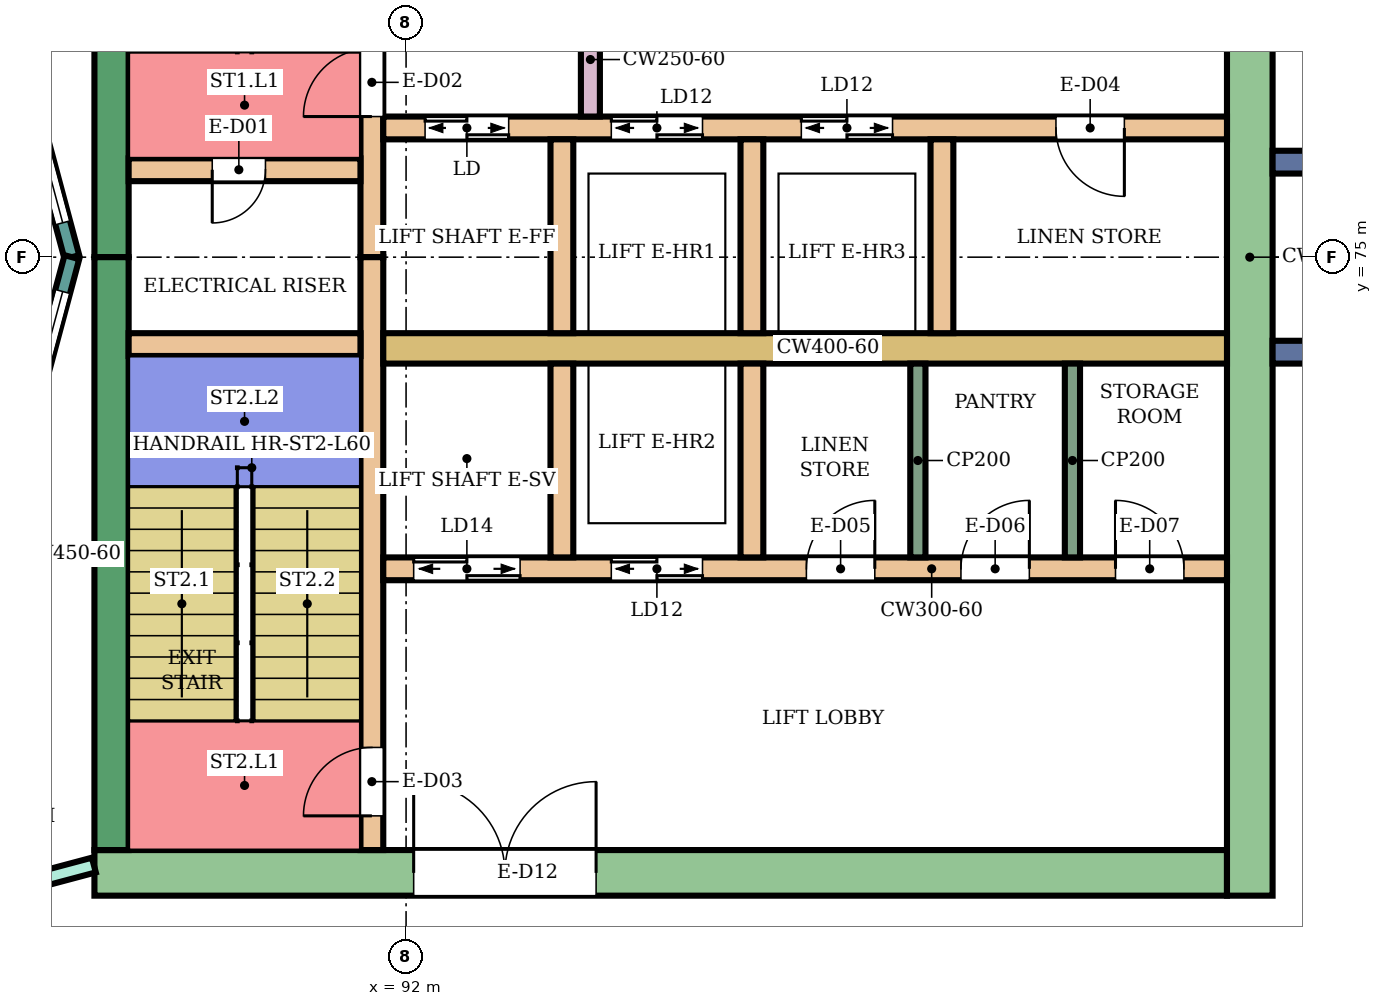
"""IFC4 building model, lengths in metres.
Left out: names, types, materials, properties, quantities, classifications, styles, units other than length and angle.
Written with IfcOpenShell. Run it as: python <this file> out.ifc"""

import sys

from ifc_helpers import new_model, si_unit, direction, frame, frame_2d, origin, place, context, subcontext, project, spatial, rectangle, extrude, element, fill, save


model = new_model("IFC4")
c1 = context("Model", 3, precision=1e-05, world=origin(), true_north=direction((0.0, 1.0)))
c2 = subcontext(c1, "Body", "Model", "MODEL_VIEW")
j1 = project(units=[si_unit("LENGTHUNIT", "METRE"), si_unit("PLANEANGLEUNIT", "RADIAN")], contexts=[c1])
p1 = place(None, origin())
s1 = spatial("IfcSite", under=j1, at=p1, CompositionType="ELEMENT")
p2 = place(p1, origin())
s2 = spatial("IfcBuilding", under=s1, at=p2, CompositionType="ELEMENT")
p3 = place(p2, frame((0.0, 0.0, 262.5)))
s3 = spatial("IfcBuildingStorey", under=s2, at=p3, CompositionType="ELEMENT", Elevation=262.5)
p4 = place(p3, frame((87.9, 66.9, 0.0), z_axis=(0.0, 0.0, 1.0), x_axis=(1.0, 0.0, 0.0)))
e1 = element("IfcWall", 1, at=p4, inside=s3, PredefinedType="SHEAR", context=c2, shape_type="SweptSolid", body=[
    extrude(rectangle(XDim=14.9, YDim=0.6, at=frame_2d((7.45, 0.0))), origin(), (0.0, 0.0, 1.0), 3.88),
])
p5 = place(p4, frame((4.2, 0.0, 0.0)))
e2 = element("IfcOpeningElement", 2, at=p5, cuts=e1, PredefinedType="OPENING", context=c2, shape_type="SweptSolid", body=[
    extrude(rectangle(XDim=2.4, YDim=2.4, at=frame_2d((1.2, 1.2))), frame((0.0, 0.31, 0.0), z_axis=(0.0, -1.0, 0.0), x_axis=(1.0, 0.0, 0.0)), (0.0, 0.0, 1.0), 0.62),
])
for number, where, z_axis, x_axis in (
    (3, (88.125, 75.0, 0.0), (0.0, 0.0, 1.0), (0.0, 1.0, 0.0)),
    (4, (88.125, 67.2, 0.0), (0.0, 0.0, 1.0), (0.0, 1.0, 0.0)),
):
    element("IfcWall", number, at=place(p3, frame(where, z_axis=z_axis, x_axis=x_axis)), inside=s3, PredefinedType="SHEAR", context=c2, shape_type="SweptSolid", body=[
        extrude(rectangle(XDim=7.8, YDim=0.45, at=frame_2d((3.9, 0.0))), origin(), (0.0, 0.0, 1.0), 3.88),
    ])
p6 = place(p3, frame((103.1, 66.6, 0.0), z_axis=(0.0, 0.0, 1.0), x_axis=(0.0, 1.0, 0.0)))
e5 = element("IfcWall", 5, at=p6, inside=s3, PredefinedType="SHEAR", context=c2, shape_type="SweptSolid", body=[
    extrude(rectangle(XDim=16.8, YDim=0.6, at=frame_2d((8.4, 0.0))), origin(), (0.0, 0.0, 1.0), 3.88),
])
p7 = place(p3, frame((91.55, 75.0, 0.0), z_axis=(0.0, 0.0, 1.0), x_axis=(0.0, 1.0, 0.0)))
e6 = element("IfcWall", 6, at=p7, inside=s3, PredefinedType="SHEAR", context=c2, shape_type="SweptSolid", body=[
    extrude(rectangle(XDim=7.8, YDim=0.3, at=frame_2d((3.9, 0.0))), origin(), (0.0, 0.0, 1.0), 3.88),
])
p8 = place(p7, frame((1.85, 0.0, 0.0)))
e7 = element("IfcOpeningElement", 7, at=p8, cuts=e6, PredefinedType="OPENING", context=c2, shape_type="SweptSolid", body=[
    extrude(rectangle(XDim=0.9, YDim=2.1, at=frame_2d((0.45, 1.05))), frame((0.0, 0.16, 0.0), z_axis=(0.0, -1.0, 0.0), x_axis=(1.0, 0.0, 0.0)), (0.0, 0.0, 1.0), 0.32),
])
p9 = place(p3, frame((91.55, 67.2, 0.0), z_axis=(0.0, 0.0, 1.0), x_axis=(0.0, 1.0, 0.0)))
e8 = element("IfcWall", 8, at=p9, inside=s3, PredefinedType="SHEAR", context=c2, shape_type="SweptSolid", body=[
    extrude(rectangle(XDim=7.8, YDim=0.3, at=frame_2d((3.9, 0.0))), origin(), (0.0, 0.0, 1.0), 3.88),
])
p10 = place(p9, frame((0.45, 0.0, 0.0)))
e9 = element("IfcOpeningElement", 9, at=p10, cuts=e8, PredefinedType="OPENING", context=c2, shape_type="SweptSolid", body=[
    extrude(rectangle(XDim=0.9, YDim=2.1, at=frame_2d((0.45, 1.05))), frame((0.0, 0.16, 0.0), z_axis=(0.0, -1.0, 0.0), x_axis=(1.0, 0.0, 0.0)), (0.0, 0.0, 1.0), 0.32),
])
p11 = place(p3, frame((88.35, 76.15, 0.0), z_axis=(0.0, 0.0, 1.0), x_axis=(1.0, 0.0, 0.0)))
e10 = element("IfcWall", 10, at=p11, inside=s3, PredefinedType="SHEAR", context=c2, shape_type="SweptSolid", body=[
    extrude(rectangle(XDim=3.05, YDim=0.3, at=frame_2d((1.525, 0.0))), origin(), (0.0, 0.0, 1.0), 3.88),
])
p12 = place(p11, frame((1.1, 0.0, 0.0)))
e11 = element("IfcOpeningElement", 11, at=p12, cuts=e10, PredefinedType="OPENING", context=c2, shape_type="SweptSolid", body=[
    extrude(rectangle(XDim=0.7, YDim=2.0, at=frame_2d((0.35, 1.0))), frame((0.0, 0.16, 0.0), z_axis=(0.0, -1.0, 0.0), x_axis=(1.0, 0.0, 0.0)), (0.0, 0.0, 1.0), 0.32),
])
p13 = place(p3, frame((88.35, 73.85, 0.0), z_axis=(0.0, 0.0, 1.0), x_axis=(1.0, 0.0, 0.0)))
e12 = element("IfcWall", 12, at=p13, inside=s3, PredefinedType="SHEAR", context=c2, shape_type="SweptSolid", body=[
    extrude(rectangle(XDim=3.05, YDim=0.3, at=frame_2d((1.525, 0.0))), origin(), (0.0, 0.0, 1.0), 3.88),
])
p14 = place(p3, frame((91.7, 76.7, 0.0), z_axis=(0.0, 0.0, 1.0), x_axis=(1.0, 0.0, 0.0)))
e13 = element("IfcWall", 13, at=p14, inside=s3, PredefinedType="SHEAR", context=c2, shape_type="SweptSolid", body=[
    extrude(rectangle(XDim=11.1, YDim=0.3, at=frame_2d((5.55, 0.0))), origin(), (0.0, 0.0, 1.0), 3.88),
])
p15 = place(p14, frame((0.55, 0.0, 0.0)))
e14 = element("IfcOpeningElement", 14, at=p15, cuts=e13, PredefinedType="OPENING", context=c2, shape_type="SweptSolid", body=[
    extrude(rectangle(XDim=1.1, YDim=2.1, at=frame_2d((0.55, 1.05))), frame((0.0, 0.16, 0.0), z_axis=(0.0, -1.0, 0.0), x_axis=(1.0, 0.0, 0.0)), (0.0, 0.0, 1.0), 0.32),
])
p16 = place(p14, frame((3.0, 0.0, 0.0)))
e15 = element("IfcOpeningElement", 15, at=p16, cuts=e13, PredefinedType="OPENING", context=c2, shape_type="SweptSolid", body=[
    extrude(rectangle(XDim=1.2, YDim=2.1, at=frame_2d((0.6, 1.05))), frame((0.0, 0.16, 0.0), z_axis=(0.0, -1.0, 0.0), x_axis=(1.0, 0.0, 0.0)), (0.0, 0.0, 1.0), 0.32),
])
p17 = place(p14, frame((5.5, 0.0, 0.0)))
e16 = element("IfcOpeningElement", 16, at=p17, cuts=e13, PredefinedType="OPENING", context=c2, shape_type="SweptSolid", body=[
    extrude(rectangle(XDim=1.2, YDim=2.1, at=frame_2d((0.6, 1.05))), frame((0.0, 0.16, 0.0), z_axis=(0.0, -1.0, 0.0), x_axis=(1.0, 0.0, 0.0)), (0.0, 0.0, 1.0), 0.32),
])
p18 = place(p14, frame((8.85, 0.0, 0.0)))
e17 = element("IfcOpeningElement", 17, at=p18, cuts=e13, PredefinedType="OPENING", context=c2, shape_type="SweptSolid", body=[
    extrude(rectangle(XDim=0.9, YDim=2.1, at=frame_2d((0.45, 1.05))), frame((0.0, 0.16, 0.0), z_axis=(0.0, -1.0, 0.0), x_axis=(1.0, 0.0, 0.0)), (0.0, 0.0, 1.0), 0.32),
])
p19 = place(p3, frame((91.7, 73.8, 0.0), z_axis=(0.0, 0.0, 1.0), x_axis=(1.0, 0.0, 0.0)))
e18 = element("IfcWall", 18, at=p19, inside=s3, PredefinedType="SHEAR", context=c2, shape_type="SweptSolid", body=[
    extrude(rectangle(XDim=11.1, YDim=0.4, at=frame_2d((5.55, 0.0))), origin(), (0.0, 0.0, 1.0), 3.88),
])
p20 = place(p3, frame((91.7, 70.9, 0.0), z_axis=(0.0, 0.0, 1.0), x_axis=(1.0, 0.0, 0.0)))
e19 = element("IfcWall", 19, at=p20, inside=s3, PredefinedType="SHEAR", context=c2, shape_type="SweptSolid", body=[
    extrude(rectangle(XDim=11.1, YDim=0.3, at=frame_2d((5.55, 0.0))), origin(), (0.0, 0.0, 1.0), 3.88),
])
p21 = place(p20, frame((0.4, 0.0, 0.0)))
e20 = element("IfcOpeningElement", 20, at=p21, cuts=e19, PredefinedType="OPENING", context=c2, shape_type="SweptSolid", body=[
    extrude(rectangle(XDim=1.4, YDim=2.1, at=frame_2d((0.7, 1.05))), frame((0.0, 0.16, 0.0), z_axis=(0.0, -1.0, 0.0), x_axis=(1.0, 0.0, 0.0)), (0.0, 0.0, 1.0), 0.32),
])
p22 = place(p20, frame((3.0, 0.0, 0.0)))
e21 = element("IfcOpeningElement", 21, at=p22, cuts=e19, PredefinedType="OPENING", context=c2, shape_type="SweptSolid", body=[
    extrude(rectangle(XDim=1.2, YDim=2.1, at=frame_2d((0.6, 1.05))), frame((0.0, 0.16, 0.0), z_axis=(0.0, -1.0, 0.0), x_axis=(1.0, 0.0, 0.0)), (0.0, 0.0, 1.0), 0.32),
])
p23 = place(p20, frame((5.567, 0.0, 0.0)))
e22 = element("IfcOpeningElement", 22, at=p23, cuts=e19, PredefinedType="OPENING", context=c2, shape_type="SweptSolid", body=[
    extrude(rectangle(XDim=0.9, YDim=2.1, at=frame_2d((0.45, 1.05))), frame((0.0, 0.16, 0.0), z_axis=(0.0, -1.0, 0.0), x_axis=(1.0, 0.0, 0.0)), (0.0, 0.0, 1.0), 0.32),
])
p24 = place(p20, frame((7.6, 0.0, 0.0)))
e23 = element("IfcOpeningElement", 23, at=p24, cuts=e19, PredefinedType="OPENING", context=c2, shape_type="SweptSolid", body=[
    extrude(rectangle(XDim=0.9, YDim=2.1, at=frame_2d((0.45, 1.05))), frame((0.0, 0.16, 0.0), z_axis=(0.0, -1.0, 0.0), x_axis=(1.0, 0.0, 0.0)), (0.0, 0.0, 1.0), 0.32),
])
p25 = place(p20, frame((9.633, 0.0, 0.0)))
e24 = element("IfcOpeningElement", 24, at=p25, cuts=e19, PredefinedType="OPENING", context=c2, shape_type="SweptSolid", body=[
    extrude(rectangle(XDim=0.9, YDim=2.1, at=frame_2d((0.45, 1.05))), frame((0.0, 0.16, 0.0), z_axis=(0.0, -1.0, 0.0), x_axis=(1.0, 0.0, 0.0)), (0.0, 0.0, 1.0), 0.32),
])
for number, where, z_axis, x_axis in (
    (25, (94.05, 74.0, 0.0), (0.0, 0.0, 1.0), (0.0, 1.0, 0.0)),
    (26, (96.55, 74.0, 0.0), (0.0, 0.0, 1.0), (0.0, 1.0, 0.0)),
    (27, (99.05, 74.0, 0.0), (0.0, 0.0, 1.0), (0.0, 1.0, 0.0)),
    (28, (94.05, 71.05, 0.0), (0.0, 0.0, 1.0), (0.0, 1.0, 0.0)),
    (29, (96.55, 71.05, 0.0), (0.0, 0.0, 1.0), (0.0, 1.0, 0.0)),
):
    element("IfcWall", number, at=place(p3, frame(where, z_axis=z_axis, x_axis=x_axis)), inside=s3, PredefinedType="SHEAR", context=c2, shape_type="SweptSolid", body=[
        extrude(rectangle(XDim=2.55, YDim=0.3, at=frame_2d((1.275, 0.0))), origin(), (0.0, 0.0, 1.0), 3.88),
    ])
p26 = place(p3, frame((94.425, 76.85, 0.0), z_axis=(0.0, 0.0, 1.0), x_axis=(0.0, 1.0, 0.0)))
e30 = element("IfcWall", 30, at=p26, inside=s3, PredefinedType="SHEAR", context=c2, shape_type="SweptSolid", body=[
    extrude(rectangle(XDim=1.5, YDim=0.25, at=frame_2d((0.75, 0.0))), origin(), (0.0, 0.0, 1.0), 3.88),
])
for number, where, z_axis, x_axis in (
    (31, (103.4, 73.75, 0.0), (0.0, 0.0, 1.0), (1.0, 0.0, 0.0)),
    (32, (103.4, 76.25, 0.0), (0.0, 0.0, 1.0), (1.0, 0.0, 0.0)),
):
    element("IfcWall", number, at=place(p3, frame(where, z_axis=z_axis, x_axis=x_axis)), inside=s3, PredefinedType="NOTDEFINED", context=c2, shape_type="SweptSolid", body=[
        extrude(rectangle(XDim=2.416, YDim=0.3, at=frame_2d((1.208, 0.0))), origin(), (0.0, 0.0, 1.0), 4.2),
    ])
p27 = place(p3, frame((87.604, 75.0, 0.0), z_axis=(0.0, 0.0, 1.0), x_axis=(-0.258789828301, 0.965933654434, 0.0)))
e33 = element("IfcWall", 33, at=p27, inside=s3, PredefinedType="NOTDEFINED", context=c2, shape_type="SweptSolid", body=[
    extrude(rectangle(XDim=3.936, YDim=0.2, at=frame_2d((1.968, 0.0))), origin(), (0.0, 0.0, 1.0), 4.2),
])
p28 = place(p27, frame((0.468, 0.0, 0.9)))
e34 = element("IfcOpeningElement", 34, at=p28, cuts=e33, PredefinedType="OPENING", context=c2, shape_type="SweptSolid", body=[
    extrude(rectangle(XDim=3.0, YDim=2.3, at=frame_2d((1.5, 1.15))), frame((0.0, 0.11, 0.0), z_axis=(0.0, -1.0, 0.0), x_axis=(1.0, 0.0, 0.0)), (0.0, 0.0, 1.0), 0.22),
])
p29 = place(p3, frame((86.585, 71.198, 0.0), z_axis=(0.0, 0.0, 1.0), x_axis=(0.258789828301, 0.965933654434, 0.0)))
e35 = element("IfcWall", 35, at=p29, inside=s3, PredefinedType="NOTDEFINED", context=c2, shape_type="SweptSolid", body=[
    extrude(rectangle(XDim=3.936, YDim=0.2, at=frame_2d((1.968, 0.0))), origin(), (0.0, 0.0, 1.0), 4.2),
])
p30 = place(p29, frame((0.468, 0.0, 0.9)))
e36 = element("IfcOpeningElement", 36, at=p30, cuts=e35, PredefinedType="OPENING", context=c2, shape_type="SweptSolid", body=[
    extrude(rectangle(XDim=3.0, YDim=2.3, at=frame_2d((1.5, 1.15))), frame((0.0, 0.11, 0.0), z_axis=(0.0, -1.0, 0.0), x_axis=(1.0, 0.0, 0.0)), (0.0, 0.0, 1.0), 0.22),
])
p31 = place(p3, frame((80.0, 64.898, 0.0), z_axis=(0.0, 0.0, 1.0), x_axis=(0.966236923997, 0.25765520896, 0.0)))
e37 = element("IfcWall", 37, at=p31, inside=s3, PredefinedType="PARTITIONING", context=c2, shape_type="SweptSolid", body=[
    extrude(rectangle(XDim=8.168, YDim=0.2, at=frame_2d((4.084, 0.0))), origin(), (0.0, 0.0, 1.0), 3.75),
])
p32 = place(p31, frame((1.893, 0.0, 0.0)))
e38 = element("IfcOpeningElement", 38, at=p32, cuts=e37, PredefinedType="OPENING", context=c2, shape_type="SweptSolid", body=[
    extrude(rectangle(XDim=1.8, YDim=2.1, at=frame_2d((0.9, 1.05))), frame((0.0, 0.11, 0.0), z_axis=(0.0, -1.0, 0.0), x_axis=(1.0, 0.0, 0.0)), (0.0, 0.0, 1.0), 0.22),
])
for number, where, z_axis, x_axis in (
    (39, (98.733, 71.05, 0.0), (0.0, 0.0, 1.0), (0.0, 1.0, 0.0)),
    (40, (100.767, 71.05, 0.0), (0.0, 0.0, 1.0), (0.0, 1.0, 0.0)),
):
    element("IfcWall", number, at=place(p3, frame(where, z_axis=z_axis, x_axis=x_axis)), inside=s3, PredefinedType="PARTITIONING", context=c2, shape_type="SweptSolid", body=[
        extrude(rectangle(XDim=2.55, YDim=0.2, at=frame_2d((1.275, 0.0))), origin(), (0.0, 0.0, 1.0), 3.88),
    ])
p33 = place(p28, origin())
e41 = element("IfcWindow", 41, at=p33, inside=s3, PartitioningType="SINGLE_PANEL", PredefinedType="WINDOW", context=c2, shape_type="SweptSolid", body=[
    extrude(rectangle(XDim=3.0, YDim=2.3, at=frame_2d((1.5, 1.15))), frame((0.0, 0.03, 0.0), z_axis=(0.0, -1.0, 0.0), x_axis=(1.0, 0.0, 0.0)), (0.0, 0.0, 1.0), 0.06),
])
fill(e34, e41)
p34 = place(p30, origin())
e42 = element("IfcWindow", 42, at=p34, inside=s3, PartitioningType="SINGLE_PANEL", PredefinedType="WINDOW", context=c2, shape_type="SweptSolid", body=[
    extrude(rectangle(XDim=3.0, YDim=2.3, at=frame_2d((1.5, 1.15))), frame((0.0, 0.03, 0.0), z_axis=(0.0, -1.0, 0.0), x_axis=(1.0, 0.0, 0.0)), (0.0, 0.0, 1.0), 0.06),
])
fill(e36, e42)
p35 = place(p12, frame((0.7, 0.0, 0.0), z_axis=(0.0, 0.0, 1.0), x_axis=(-1.0, 0.0, 0.0)))
e43 = element("IfcDoor", 43, at=p35, inside=s3, OperationType="SINGLE_SWING_RIGHT", PredefinedType="DOOR", context=c2, shape_type="SweptSolid", body=[
    extrude(rectangle(XDim=0.7, YDim=2.0, at=frame_2d((0.35, 1.0))), frame((0.0, 0.025, 0.0), z_axis=(0.0, -1.0, 0.0), x_axis=(1.0, 0.0, 0.0)), (0.0, 0.0, 1.0), 0.05),
])
fill(e11, e43)
p36 = place(p8, origin())
e44 = element("IfcDoor", 44, at=p36, inside=s3, OperationType="SINGLE_SWING_LEFT", PredefinedType="DOOR", context=c2, shape_type="SweptSolid", body=[
    extrude(rectangle(XDim=0.9, YDim=2.1, at=frame_2d((0.45, 1.05))), frame((0.0, 0.025, 0.0), z_axis=(0.0, -1.0, 0.0), x_axis=(1.0, 0.0, 0.0)), (0.0, 0.0, 1.0), 0.05),
])
fill(e7, e44)
p37 = place(p10, origin())
e45 = element("IfcDoor", 45, at=p37, inside=s3, OperationType="SINGLE_SWING_LEFT", PredefinedType="DOOR", context=c2, shape_type="SweptSolid", body=[
    extrude(rectangle(XDim=0.9, YDim=2.1, at=frame_2d((0.45, 1.05))), frame((0.0, 0.025, 0.0), z_axis=(0.0, -1.0, 0.0), x_axis=(1.0, 0.0, 0.0)), (0.0, 0.0, 1.0), 0.05),
])
fill(e9, e45)
p38 = place(p15, origin())
e46 = element("IfcDoor", 46, at=p38, inside=s3, OperationType="DOUBLE_DOOR_SLIDING", PredefinedType="DOOR", context=c2, shape_type="SweptSolid", body=[
    extrude(rectangle(XDim=1.1, YDim=2.1, at=frame_2d((0.55, 1.05))), frame((0.0, 0.025, 0.0), z_axis=(0.0, -1.0, 0.0), x_axis=(1.0, 0.0, 0.0)), (0.0, 0.0, 1.0), 0.05),
])
fill(e14, e46)
p39 = place(p16, origin())
e47 = element("IfcDoor", 47, at=p39, inside=s3, OperationType="DOUBLE_DOOR_SLIDING", PredefinedType="DOOR", context=c2, shape_type="SweptSolid", body=[
    extrude(rectangle(XDim=1.2, YDim=2.1, at=frame_2d((0.6, 1.05))), frame((0.0, 0.025, 0.0), z_axis=(0.0, -1.0, 0.0), x_axis=(1.0, 0.0, 0.0)), (0.0, 0.0, 1.0), 0.05),
])
fill(e15, e47)
p40 = place(p17, origin())
e48 = element("IfcDoor", 48, at=p40, inside=s3, OperationType="DOUBLE_DOOR_SLIDING", PredefinedType="DOOR", context=c2, shape_type="SweptSolid", body=[
    extrude(rectangle(XDim=1.2, YDim=2.1, at=frame_2d((0.6, 1.05))), frame((0.0, 0.025, 0.0), z_axis=(0.0, -1.0, 0.0), x_axis=(1.0, 0.0, 0.0)), (0.0, 0.0, 1.0), 0.05),
])
fill(e16, e48)
p41 = place(p18, frame((0.9, 0.0, 0.0), z_axis=(0.0, 0.0, 1.0), x_axis=(-1.0, 0.0, 0.0)))
e49 = element("IfcDoor", 49, at=p41, inside=s3, OperationType="SINGLE_SWING_LEFT", PredefinedType="DOOR", context=c2, shape_type="SweptSolid", body=[
    extrude(rectangle(XDim=0.9, YDim=2.1, at=frame_2d((0.45, 1.05))), frame((0.0, 0.025, 0.0), z_axis=(0.0, -1.0, 0.0), x_axis=(1.0, 0.0, 0.0)), (0.0, 0.0, 1.0), 0.05),
])
fill(e17, e49)
p42 = place(p21, origin())
e50 = element("IfcDoor", 50, at=p42, inside=s3, OperationType="DOUBLE_DOOR_SLIDING", PredefinedType="DOOR", context=c2, shape_type="SweptSolid", body=[
    extrude(rectangle(XDim=1.4, YDim=2.1, at=frame_2d((0.7, 1.05))), frame((0.0, 0.025, 0.0), z_axis=(0.0, -1.0, 0.0), x_axis=(1.0, 0.0, 0.0)), (0.0, 0.0, 1.0), 0.05),
])
fill(e20, e50)
p43 = place(p22, origin())
e51 = element("IfcDoor", 51, at=p43, inside=s3, OperationType="DOUBLE_DOOR_SLIDING", PredefinedType="DOOR", context=c2, shape_type="SweptSolid", body=[
    extrude(rectangle(XDim=1.2, YDim=2.1, at=frame_2d((0.6, 1.05))), frame((0.0, 0.025, 0.0), z_axis=(0.0, -1.0, 0.0), x_axis=(1.0, 0.0, 0.0)), (0.0, 0.0, 1.0), 0.05),
])
fill(e21, e51)
p44 = place(p23, origin())
e52 = element("IfcDoor", 52, at=p44, inside=s3, OperationType="SINGLE_SWING_RIGHT", PredefinedType="DOOR", context=c2, shape_type="SweptSolid", body=[
    extrude(rectangle(XDim=0.9, YDim=2.1, at=frame_2d((0.45, 1.05))), frame((0.0, 0.025, 0.0), z_axis=(0.0, -1.0, 0.0), x_axis=(1.0, 0.0, 0.0)), (0.0, 0.0, 1.0), 0.05),
])
fill(e22, e52)
p45 = place(p24, origin())
e53 = element("IfcDoor", 53, at=p45, inside=s3, OperationType="SINGLE_SWING_RIGHT", PredefinedType="DOOR", context=c2, shape_type="SweptSolid", body=[
    extrude(rectangle(XDim=0.9, YDim=2.1, at=frame_2d((0.45, 1.05))), frame((0.0, 0.025, 0.0), z_axis=(0.0, -1.0, 0.0), x_axis=(1.0, 0.0, 0.0)), (0.0, 0.0, 1.0), 0.05),
])
fill(e23, e53)
p46 = place(p25, origin())
e54 = element("IfcDoor", 54, at=p46, inside=s3, OperationType="SINGLE_SWING_LEFT", PredefinedType="DOOR", context=c2, shape_type="SweptSolid", body=[
    extrude(rectangle(XDim=0.9, YDim=2.1, at=frame_2d((0.45, 1.05))), frame((0.0, 0.025, 0.0), z_axis=(0.0, -1.0, 0.0), x_axis=(1.0, 0.0, 0.0)), (0.0, 0.0, 1.0), 0.05),
])
fill(e24, e54)
p47 = place(p5, origin())
e55 = element("IfcDoor", 55, at=p47, inside=s3, OperationType="DOUBLE_DOOR_SINGLE_SWING", PredefinedType="DOOR", context=c2, shape_type="SweptSolid", body=[
    extrude(rectangle(XDim=2.4, YDim=2.4, at=frame_2d((1.2, 1.2))), frame((0.0, 0.025, 0.0), z_axis=(0.0, -1.0, 0.0), x_axis=(1.0, 0.0, 0.0)), (0.0, 0.0, 1.0), 0.05),
])
fill(e2, e55)
save(model, sys.argv[1])
